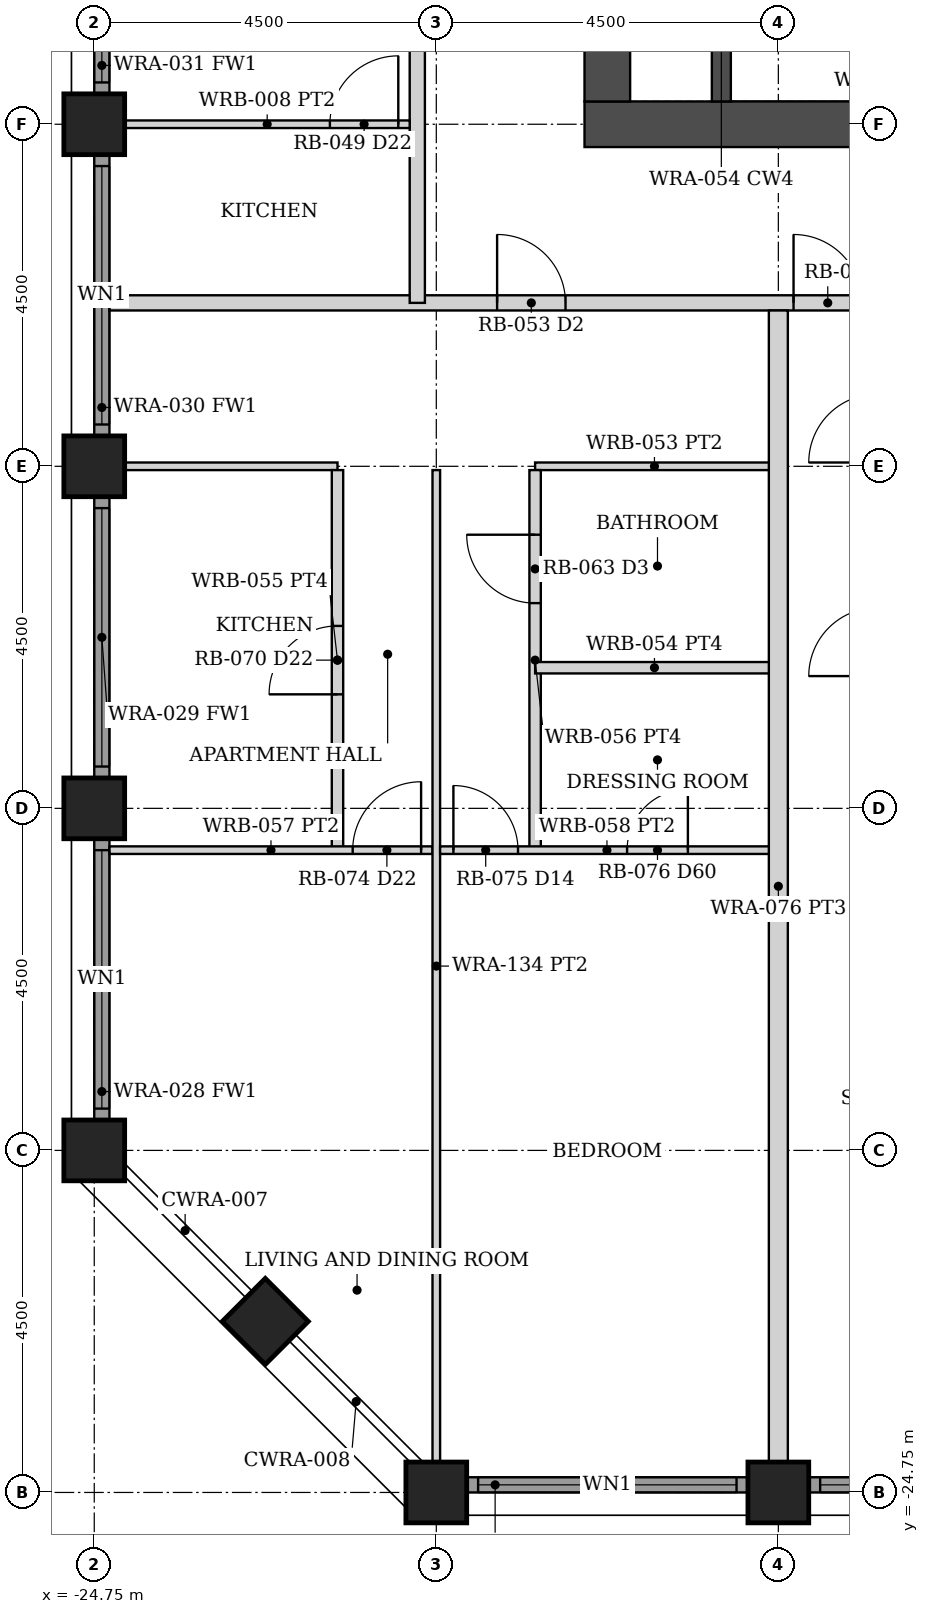
"""IFC4 building model, lengths in metres.
Left out: names, types, materials, properties, quantities, classifications, styles, units other than length and angle.
Written with IfcOpenShell. Run it as: python <this file> out.ifc"""

import sys

from ifc_helpers import new_model, si_unit, direction, frame, frame_2d, origin, origin_2d, place, context, subcontext, project, spatial, rectangle, hollow_rectangle, extrude, element, fill, save


model = new_model("IFC4")
c1 = context("Model", 3, precision=1e-05, world=origin(), true_north=direction((0.0, 1.0)))
c2 = subcontext(c1, "Body", "Model", "MODEL_VIEW")
j1 = project(units=[si_unit("LENGTHUNIT", "METRE"), si_unit("PLANEANGLEUNIT", "RADIAN")], contexts=[c1])
p1 = place(None, origin())
s1 = spatial("IfcSite", under=j1, at=p1, CompositionType="ELEMENT")
p2 = place(p1, origin())
s2 = spatial("IfcBuilding", under=s1, at=p2, CompositionType="ELEMENT")
p3 = place(p2, frame((0.0, 0.0, 37.0)))
s3 = spatial("IfcBuildingStorey", under=s2, at=p3, CompositionType="ELEMENT", Elevation=37.0)
for number, where, z_axis, x_axis in (
    (1, (-20.25, -24.75, 0.0), (0.0, 0.0, 1.0), (0.0, 1.0, 0.0)),
    (2, (-24.75, -20.25, 0.0), (0.0, 0.0, 1.0), (1.0, 0.0, 0.0)),
    (3, (-15.75, -24.75, 0.0), (0.0, 0.0, 1.0), (0.0, 1.0, 0.0)),
    (4, (-24.75, -15.75, 0.0), (0.0, 0.0, 1.0), (1.0, 0.0, 0.0)),
    (5, (-24.75, -11.25, 0.0), (0.0, 0.0, 1.0), (1.0, 0.0, 0.0)),
    (6, (-24.75, -6.75, 0.0), (0.0, 0.0, 1.0), (1.0, 0.0, 0.0)),
    (7, (-22.5, -22.5, 0.0), (0.0, 0.0, 1.0), (0.707, 0.707, 0.0)),
):
    element("IfcColumn", number, at=place(p3, frame(where, z_axis=z_axis, x_axis=x_axis)), inside=s3, PredefinedType="COLUMN", context=c2, shape_type="SweptSolid", body=[
        extrude(hollow_rectangle(XDim=0.8, YDim=0.8, WallThickness=0.07, at=origin_2d()), origin(), (0.0, 0.0, 1.0), 3.5),
    ])
p4 = place(p3, frame((-8.7, -6.75, 0.0), z_axis=(0.0, 0.0, 1.0), x_axis=(-1.0, 0.0, 0.0)))
e8 = element("IfcWall", 8, at=p4, inside=s3, PredefinedType="SHEAR", context=c2, shape_type="SweptSolid", body=[
    extrude(rectangle(XDim=9.6, YDim=0.6, at=frame_2d((4.8, 0.0))), origin(), (0.0, 0.0, 1.0), 3.5),
])
p5 = place(p3, frame((-18.0, -6.45, 0.0), z_axis=(0.0, 0.0, 1.0), x_axis=(0.0, 1.0, 0.0)))
e9 = element("IfcWall", 9, at=p5, inside=s3, PredefinedType="SHEAR", context=c2, shape_type="SweptSolid", body=[
    extrude(rectangle(XDim=12.9, YDim=0.6, at=frame_2d((6.45, 0.0))), origin(), (0.0, 0.0, 1.0), 3.5),
])
p6 = place(p3, frame((-16.5, -6.45, 0.0), z_axis=(0.0, 0.0, 1.0), x_axis=(0.0, 1.0, 0.0)))
e10 = element("IfcWall", 10, at=p6, inside=s3, PredefinedType="SHEAR", context=c2, shape_type="SweptSolid", body=[
    extrude(rectangle(XDim=3.125, YDim=0.25, at=frame_2d((1.562, 0.0))), origin(), (0.0, 0.0, 1.0), 3.5),
])
p7 = place(p3, frame((-19.845, -24.65, 0.0), z_axis=(0.0, 0.0, 1.0), x_axis=(1.0, 0.0, 0.0)))
e11 = element("IfcWall", 11, at=p7, inside=s3, PredefinedType="SOLIDWALL", context=c2, shape_type="SweptSolid", body=[
    extrude(rectangle(XDim=3.69, YDim=0.2, at=frame_2d((1.845, 0.0))), origin(), (0.0, 0.0, 1.0), 2.379),
])
p8 = place(p7, frame((0.145, 0.0, 0.3)))
e12 = element("IfcOpeningElement", 12, at=p8, cuts=e11, PredefinedType="OPENING", context=c2, shape_type="SweptSolid", body=[
    extrude(rectangle(XDim=3.4, YDim=1.929, at=frame_2d((1.7, 0.964))), frame((0.0, 0.11, 0.0), z_axis=(0.0, -1.0, 0.0), x_axis=(1.0, 0.0, 0.0)), (0.0, 0.0, 1.0), 0.22),
])
p9 = place(p3, frame((-15.345, -24.65, 0.0), z_axis=(0.0, 0.0, 1.0), x_axis=(1.0, 0.0, 0.0)))
e13 = element("IfcWall", 13, at=p9, inside=s3, PredefinedType="SOLIDWALL", context=c2, shape_type="SweptSolid", body=[
    extrude(rectangle(XDim=3.69, YDim=0.2, at=frame_2d((1.845, 0.0))), origin(), (0.0, 0.0, 1.0), 2.379),
])
p10 = place(p9, frame((0.145, 0.0, 0.3)))
e14 = element("IfcOpeningElement", 14, at=p10, cuts=e13, PredefinedType="OPENING", context=c2, shape_type="SweptSolid", body=[
    extrude(rectangle(XDim=3.4, YDim=1.929, at=frame_2d((1.7, 0.964))), frame((0.0, 0.11, 0.0), z_axis=(0.0, -1.0, 0.0), x_axis=(1.0, 0.0, 0.0)), (0.0, 0.0, 1.0), 0.22),
])
p11 = place(p3, frame((-24.65, -19.845, 0.0), z_axis=(0.0, 0.0, 1.0), x_axis=(0.0, 1.0, 0.0)))
e15 = element("IfcWall", 15, at=p11, inside=s3, PredefinedType="SOLIDWALL", context=c2, shape_type="SweptSolid", body=[
    extrude(rectangle(XDim=3.69, YDim=0.2, at=frame_2d((1.845, 0.0))), origin(), (0.0, 0.0, 1.0), 2.379),
])
p12 = place(p11, frame((0.145, 0.0, 0.3)))
e16 = element("IfcOpeningElement", 16, at=p12, cuts=e15, PredefinedType="OPENING", context=c2, shape_type="SweptSolid", body=[
    extrude(rectangle(XDim=3.4, YDim=1.929, at=frame_2d((1.7, 0.964))), frame((0.0, 0.11, 0.0), z_axis=(0.0, -1.0, 0.0), x_axis=(1.0, 0.0, 0.0)), (0.0, 0.0, 1.0), 0.22),
])
p13 = place(p3, frame((-24.65, -15.345, 0.0), z_axis=(0.0, 0.0, 1.0), x_axis=(0.0, 1.0, 0.0)))
e17 = element("IfcWall", 17, at=p13, inside=s3, PredefinedType="SOLIDWALL", context=c2, shape_type="SweptSolid", body=[
    extrude(rectangle(XDim=3.69, YDim=0.2, at=frame_2d((1.845, 0.0))), origin(), (0.0, 0.0, 1.0), 2.379),
])
p14 = place(p13, frame((0.145, 0.0, 0.3)))
e18 = element("IfcOpeningElement", 18, at=p14, cuts=e17, PredefinedType="OPENING", context=c2, shape_type="SweptSolid", body=[
    extrude(rectangle(XDim=3.4, YDim=1.929, at=frame_2d((1.7, 0.964))), frame((0.0, 0.11, 0.0), z_axis=(0.0, -1.0, 0.0), x_axis=(1.0, 0.0, 0.0)), (0.0, 0.0, 1.0), 0.22),
])
p15 = place(p3, frame((-24.65, -10.845, 0.0), z_axis=(0.0, 0.0, 1.0), x_axis=(0.0, 1.0, 0.0)))
e19 = element("IfcWall", 19, at=p15, inside=s3, PredefinedType="SOLIDWALL", context=c2, shape_type="SweptSolid", body=[
    extrude(rectangle(XDim=3.69, YDim=0.2, at=frame_2d((1.845, 0.0))), origin(), (0.0, 0.0, 1.0), 2.379),
])
p16 = place(p15, frame((0.145, 0.0, 0.3)))
e20 = element("IfcOpeningElement", 20, at=p16, cuts=e19, PredefinedType="OPENING", context=c2, shape_type="SweptSolid", body=[
    extrude(rectangle(XDim=3.4, YDim=1.929, at=frame_2d((1.7, 0.964))), frame((0.0, 0.11, 0.0), z_axis=(0.0, -1.0, 0.0), x_axis=(1.0, 0.0, 0.0)), (0.0, 0.0, 1.0), 0.22),
])
p17 = place(p3, frame((-24.65, -6.345, 0.0), z_axis=(0.0, 0.0, 1.0), x_axis=(0.0, 1.0, 0.0)))
e21 = element("IfcWall", 21, at=p17, inside=s3, PredefinedType="SOLIDWALL", context=c2, shape_type="SweptSolid", body=[
    extrude(rectangle(XDim=3.69, YDim=0.2, at=frame_2d((1.845, 0.0))), origin(), (0.0, 0.0, 1.0), 2.379),
])
p18 = place(p17, frame((0.145, 0.0, 0.3)))
e22 = element("IfcOpeningElement", 22, at=p18, cuts=e21, PredefinedType="OPENING", context=c2, shape_type="SweptSolid", body=[
    extrude(rectangle(XDim=3.4, YDim=1.929, at=frame_2d((1.7, 0.964))), frame((0.0, 0.11, 0.0), z_axis=(0.0, -1.0, 0.0), x_axis=(1.0, 0.0, 0.0)), (0.0, 0.0, 1.0), 0.22),
])
p19 = place(p3, frame((-24.55, -9.1, 0.0), z_axis=(0.0, 0.0, 1.0), x_axis=(1.0, 0.0, 0.0)))
e23 = element("IfcWall", 23, at=p19, inside=s3, PredefinedType="PARTITIONING", context=c2, shape_type="SweptSolid", body=[
    extrude(rectangle(XDim=49.1, YDim=0.2, at=frame_2d((24.55, 0.0))), origin(), (0.0, 0.0, 1.0), 2.373),
])
p20 = place(p19, frame((5.1, 0.0, 0.0)))
e24 = element("IfcOpeningElement", 24, at=p20, cuts=e23, PredefinedType="OPENING", context=c2, shape_type="SweptSolid", body=[
    extrude(rectangle(XDim=0.9, YDim=2.1, at=frame_2d((0.45, 1.05))), frame((0.0, 0.11, 0.0), z_axis=(0.0, -1.0, 0.0), x_axis=(1.0, 0.0, 0.0)), (0.0, 0.0, 1.0), 0.22),
])
p21 = place(p19, frame((9.0, 0.0, 0.0)))
e25 = element("IfcOpeningElement", 25, at=p21, cuts=e23, PredefinedType="OPENING", context=c2, shape_type="SweptSolid", body=[
    extrude(rectangle(XDim=0.9, YDim=2.1, at=frame_2d((0.45, 1.05))), frame((0.0, 0.11, 0.0), z_axis=(0.0, -1.0, 0.0), x_axis=(1.0, 0.0, 0.0)), (0.0, 0.0, 1.0), 0.22),
])
p22 = place(p19, frame((18.1, 0.0, 0.0)))
e26 = element("IfcOpeningElement", 26, at=p22, cuts=e23, PredefinedType="OPENING", context=c2, shape_type="SweptSolid", body=[
    extrude(rectangle(XDim=0.9, YDim=2.1, at=frame_2d((0.45, 1.05))), frame((0.0, 0.11, 0.0), z_axis=(0.0, -1.0, 0.0), x_axis=(1.0, 0.0, 0.0)), (0.0, 0.0, 1.0), 0.22),
])
p23 = place(p19, frame((22.5, 0.0, 0.0)))
e27 = element("IfcOpeningElement", 27, at=p23, cuts=e23, PredefinedType="OPENING", context=c2, shape_type="SweptSolid", body=[
    extrude(rectangle(XDim=0.9, YDim=2.1, at=frame_2d((0.45, 1.05))), frame((0.0, 0.11, 0.0), z_axis=(0.0, -1.0, 0.0), x_axis=(1.0, 0.0, 0.0)), (0.0, 0.0, 1.0), 0.22),
])
p24 = place(p19, frame((27.1, 0.0, 0.0)))
e28 = element("IfcOpeningElement", 28, at=p24, cuts=e23, PredefinedType="OPENING", context=c2, shape_type="SweptSolid", body=[
    extrude(rectangle(XDim=0.9, YDim=2.1, at=frame_2d((0.45, 1.05))), frame((0.0, 0.11, 0.0), z_axis=(0.0, -1.0, 0.0), x_axis=(1.0, 0.0, 0.0)), (0.0, 0.0, 1.0), 0.22),
])
p25 = place(p19, frame((36.0, 0.0, 0.0)))
e29 = element("IfcOpeningElement", 29, at=p25, cuts=e23, PredefinedType="OPENING", context=c2, shape_type="SweptSolid", body=[
    extrude(rectangle(XDim=0.9, YDim=2.1, at=frame_2d((0.45, 1.05))), frame((0.0, 0.11, 0.0), z_axis=(0.0, -1.0, 0.0), x_axis=(1.0, 0.0, 0.0)), (0.0, 0.0, 1.0), 0.22),
])
p26 = place(p19, frame((43.1, 0.0, 0.0)))
e30 = element("IfcOpeningElement", 30, at=p26, cuts=e23, PredefinedType="OPENING", context=c2, shape_type="SweptSolid", body=[
    extrude(rectangle(XDim=0.9, YDim=2.1, at=frame_2d((0.45, 1.05))), frame((0.0, 0.11, 0.0), z_axis=(0.0, -1.0, 0.0), x_axis=(1.0, 0.0, 0.0)), (0.0, 0.0, 1.0), 0.22),
])
p27 = place(p3, frame((-20.5, -9.1, 0.0), z_axis=(0.0, 0.0, 1.0), x_axis=(0.0, 1.0, 0.0)))
e31 = element("IfcWall", 31, at=p27, inside=s3, PredefinedType="PARTITIONING", context=c2, shape_type="SweptSolid", body=[
    extrude(rectangle(XDim=18.2, YDim=0.2, at=frame_2d((9.1, 0.0))), origin(), (0.0, 0.0, 1.0), 2.373),
])
p28 = place(p27, frame((6.4, 0.0, 0.0)))
e32 = element("IfcOpeningElement", 32, at=p28, cuts=e31, PredefinedType="OPENING", context=c2, shape_type="SweptSolid", body=[
    extrude(rectangle(XDim=0.9, YDim=2.1, at=frame_2d((0.45, 1.05))), frame((0.0, 0.11, 0.0), z_axis=(0.0, -1.0, 0.0), x_axis=(1.0, 0.0, 0.0)), (0.0, 0.0, 1.0), 0.22),
])
p29 = place(p3, frame((-24.35, -11.25, 0.0), z_axis=(0.0, 0.0, 1.0), x_axis=(1.0, 0.0, 0.0)))
e33 = element("IfcWall", 33, at=p29, inside=s3, PredefinedType="PARTITIONING", context=c2, shape_type="SweptSolid", body=[
    extrude(rectangle(XDim=2.8, YDim=0.1, at=frame_2d((1.4, 0.0))), origin(), (0.0, 0.0, 1.0), 2.373),
])
p30 = place(p3, frame((-21.55, -16.3, 0.0), z_axis=(0.0, 0.0, 1.0), x_axis=(0.0, 1.0, 0.0)))
e34 = element("IfcWall", 34, at=p30, inside=s3, PredefinedType="PARTITIONING", context=c2, shape_type="SweptSolid", body=[
    extrude(rectangle(XDim=5.0, YDim=0.15, at=frame_2d((2.5, 0.0))), origin(), (0.0, 0.0, 1.0), 2.373),
])
p31 = place(p30, frame((2.05, 0.0, 0.0)))
e35 = element("IfcOpeningElement", 35, at=p31, cuts=e34, PredefinedType="OPENING", context=c2, shape_type="SweptSolid", body=[
    extrude(rectangle(XDim=0.9, YDim=2.1, at=frame_2d((0.45, 1.05))), frame((0.0, 0.085, 0.0), z_axis=(0.0, -1.0, 0.0), x_axis=(1.0, 0.0, 0.0)), (0.0, 0.0, 1.0), 0.17),
])
p32 = place(p3, frame((-24.55, -16.3, 0.0), z_axis=(0.0, 0.0, 1.0), x_axis=(1.0, 0.0, 0.0)))
e36 = element("IfcWall", 36, at=p32, inside=s3, PredefinedType="PARTITIONING", context=c2, shape_type="SweptSolid", body=[
    extrude(rectangle(XDim=4.25, YDim=0.1, at=frame_2d((2.125, 0.0))), origin(), (0.0, 0.0, 1.0), 2.373),
])
p33 = place(p32, frame((3.2, 0.0, 0.0)))
e37 = element("IfcOpeningElement", 37, at=p33, cuts=e36, PredefinedType="OPENING", context=c2, shape_type="SweptSolid", body=[
    extrude(rectangle(XDim=0.9, YDim=2.1, at=frame_2d((0.45, 1.05))), frame((0.0, 0.06, 0.0), z_axis=(0.0, -1.0, 0.0), x_axis=(1.0, 0.0, 0.0)), (0.0, 0.0, 1.0), 0.12),
])
p34 = place(p3, frame((-20.25, -24.35, 0.0), z_axis=(0.0, 0.0, 1.0), x_axis=(0.0, 1.0, 0.0)))
e38 = element("IfcWall", 38, at=p34, inside=s3, PredefinedType="PARTITIONING", context=c2, shape_type="SweptSolid", body=[
    extrude(rectangle(XDim=13.05, YDim=0.1, at=frame_2d((6.525, 0.0))), origin(), (0.0, 0.0, 1.0), 2.373),
])
p35 = place(p3, frame((-18.95, -11.25, 0.0), z_axis=(0.0, 0.0, 1.0), x_axis=(1.0, 0.0, 0.0)))
e39 = element("IfcWall", 39, at=p35, inside=s3, PredefinedType="PARTITIONING", context=c2, shape_type="SweptSolid", body=[
    extrude(rectangle(XDim=3.14, YDim=0.1, at=frame_2d((1.57, 0.0))), origin(), (0.0, 0.0, 1.0), 2.373),
])
p36 = place(p3, frame((-18.95, -16.3, 0.0), z_axis=(0.0, 0.0, 1.0), x_axis=(0.0, 1.0, 0.0)))
e40 = element("IfcWall", 40, at=p36, inside=s3, PredefinedType="PARTITIONING", context=c2, shape_type="SweptSolid", body=[
    extrude(rectangle(XDim=5.0, YDim=0.15, at=frame_2d((2.5, 0.0))), origin(), (0.0, 0.0, 1.0), 2.373),
])
p37 = place(p36, frame((3.25, 0.0, 0.0)))
e41 = element("IfcOpeningElement", 41, at=p37, cuts=e40, PredefinedType="OPENING", context=c2, shape_type="SweptSolid", body=[
    extrude(rectangle(XDim=0.9, YDim=2.1, at=frame_2d((0.45, 1.05))), frame((0.0, 0.085, 0.0), z_axis=(0.0, -1.0, 0.0), x_axis=(1.0, 0.0, 0.0)), (0.0, 0.0, 1.0), 0.17),
])
p38 = place(p3, frame((-20.2, -16.3, 0.0), z_axis=(0.0, 0.0, 1.0), x_axis=(1.0, 0.0, 0.0)))
e42 = element("IfcWall", 42, at=p38, inside=s3, PredefinedType="PARTITIONING", context=c2, shape_type="SweptSolid", body=[
    extrude(rectangle(XDim=4.39, YDim=0.1, at=frame_2d((2.195, 0.0))), origin(), (0.0, 0.0, 1.0), 2.373),
])
p39 = place(p38, frame((0.175, 0.0, 0.0)))
e43 = element("IfcOpeningElement", 43, at=p39, cuts=e42, PredefinedType="OPENING", context=c2, shape_type="SweptSolid", body=[
    extrude(rectangle(XDim=0.85, YDim=2.1, at=frame_2d((0.425, 1.05))), frame((0.0, 0.06, 0.0), z_axis=(0.0, -1.0, 0.0), x_axis=(1.0, 0.0, 0.0)), (0.0, 0.0, 1.0), 0.12),
])
p40 = place(p38, frame((2.46, 0.0, 0.0)))
e44 = element("IfcOpeningElement", 44, at=p40, cuts=e42, PredefinedType="OPENING", context=c2, shape_type="SweptSolid", body=[
    extrude(rectangle(XDim=0.8, YDim=2.1, at=frame_2d((0.4, 1.05))), frame((0.0, 0.06, 0.0), z_axis=(0.0, -1.0, 0.0), x_axis=(1.0, 0.0, 0.0)), (0.0, 0.0, 1.0), 0.12),
])
p41 = place(p3, frame((-18.95, -13.9, 0.0), z_axis=(0.0, 0.0, 1.0), x_axis=(1.0, 0.0, 0.0)))
e45 = element("IfcWall", 45, at=p41, inside=s3, PredefinedType="PARTITIONING", context=c2, shape_type="SweptSolid", body=[
    extrude(rectangle(XDim=3.14, YDim=0.15, at=frame_2d((1.57, 0.0))), origin(), (0.0, 0.0, 1.0), 2.373),
])
p42 = place(p3, frame((-15.75, -24.35, 0.0), z_axis=(0.0, 0.0, 1.0), x_axis=(0.0, 1.0, 0.0)))
e46 = element("IfcWall", 46, at=p42, inside=s3, PredefinedType="PARTITIONING", context=c2, shape_type="SweptSolid", body=[
    extrude(rectangle(XDim=15.15, YDim=0.25, at=frame_2d((7.575, 0.0))), origin(), (0.0, 0.0, 1.0), 2.373),
])
p43 = place(p3, frame((-24.35, -6.75, 0.0), z_axis=(0.0, 0.0, 1.0), x_axis=(1.0, 0.0, 0.0)))
e47 = element("IfcWall", 47, at=p43, inside=s3, PredefinedType="PARTITIONING", context=c2, shape_type="SweptSolid", body=[
    extrude(rectangle(XDim=3.75, YDim=0.1, at=frame_2d((1.875, 0.0))), origin(), (0.0, 0.0, 1.0), 2.373),
])
p44 = place(p43, frame((2.7, 0.0, 0.0)))
e48 = element("IfcOpeningElement", 48, at=p44, cuts=e47, PredefinedType="OPENING", context=c2, shape_type="SweptSolid", body=[
    extrude(rectangle(XDim=0.9, YDim=2.1, at=frame_2d((0.45, 1.05))), frame((0.0, 0.06, 0.0), z_axis=(0.0, -1.0, 0.0), x_axis=(1.0, 0.0, 0.0)), (0.0, 0.0, 1.0), 0.12),
])
p45 = place(p8, origin())
e49 = element("IfcWindow", 49, at=p45, inside=s3, PartitioningType="SINGLE_PANEL", PredefinedType="WINDOW", context=c2, shape_type="SweptSolid", body=[
    extrude(rectangle(XDim=3.4, YDim=1.929, at=frame_2d((1.7, 0.964))), frame((0.0, 0.03, 0.0), z_axis=(0.0, -1.0, 0.0), x_axis=(1.0, 0.0, 0.0)), (0.0, 0.0, 1.0), 0.06),
])
fill(e12, e49)
p46 = place(p10, origin())
e50 = element("IfcWindow", 50, at=p46, inside=s3, PartitioningType="SINGLE_PANEL", PredefinedType="WINDOW", context=c2, shape_type="SweptSolid", body=[
    extrude(rectangle(XDim=3.4, YDim=1.929, at=frame_2d((1.7, 0.964))), frame((0.0, 0.03, 0.0), z_axis=(0.0, -1.0, 0.0), x_axis=(1.0, 0.0, 0.0)), (0.0, 0.0, 1.0), 0.06),
])
fill(e14, e50)
p47 = place(p12, origin())
e51 = element("IfcWindow", 51, at=p47, inside=s3, PartitioningType="SINGLE_PANEL", PredefinedType="WINDOW", context=c2, shape_type="SweptSolid", body=[
    extrude(rectangle(XDim=3.4, YDim=1.929, at=frame_2d((1.7, 0.964))), frame((0.0, 0.03, 0.0), z_axis=(0.0, -1.0, 0.0), x_axis=(1.0, 0.0, 0.0)), (0.0, 0.0, 1.0), 0.06),
])
fill(e16, e51)
p48 = place(p14, origin())
e52 = element("IfcWindow", 52, at=p48, inside=s3, PartitioningType="SINGLE_PANEL", PredefinedType="WINDOW", context=c2, shape_type="SweptSolid", body=[
    extrude(rectangle(XDim=3.4, YDim=1.929, at=frame_2d((1.7, 0.964))), frame((0.0, 0.03, 0.0), z_axis=(0.0, -1.0, 0.0), x_axis=(1.0, 0.0, 0.0)), (0.0, 0.0, 1.0), 0.06),
])
fill(e18, e52)
p49 = place(p16, origin())
e53 = element("IfcWindow", 53, at=p49, inside=s3, PartitioningType="SINGLE_PANEL", PredefinedType="WINDOW", context=c2, shape_type="SweptSolid", body=[
    extrude(rectangle(XDim=3.4, YDim=1.929, at=frame_2d((1.7, 0.964))), frame((0.0, 0.03, 0.0), z_axis=(0.0, -1.0, 0.0), x_axis=(1.0, 0.0, 0.0)), (0.0, 0.0, 1.0), 0.06),
])
fill(e20, e53)
p50 = place(p18, origin())
e54 = element("IfcWindow", 54, at=p50, inside=s3, PartitioningType="SINGLE_PANEL", PredefinedType="WINDOW", context=c2, shape_type="SweptSolid", body=[
    extrude(rectangle(XDim=3.4, YDim=1.929, at=frame_2d((1.7, 0.964))), frame((0.0, 0.03, 0.0), z_axis=(0.0, -1.0, 0.0), x_axis=(1.0, 0.0, 0.0)), (0.0, 0.0, 1.0), 0.06),
])
fill(e22, e54)
p51 = place(p20, origin())
e55 = element("IfcDoor", 55, at=p51, inside=s3, OperationType="SINGLE_SWING_LEFT", PredefinedType="DOOR", context=c2, shape_type="SweptSolid", body=[
    extrude(rectangle(XDim=0.9, YDim=2.1, at=frame_2d((0.45, 1.05))), frame((0.0, 0.025, 0.0), z_axis=(0.0, -1.0, 0.0), x_axis=(1.0, 0.0, 0.0)), (0.0, 0.0, 1.0), 0.05),
])
fill(e24, e55)
p52 = place(p31, origin())
e56 = element("IfcDoor", 56, at=p52, inside=s3, OperationType="SINGLE_SWING_LEFT", PredefinedType="DOOR", context=c2, shape_type="SweptSolid", body=[
    extrude(rectangle(XDim=0.9, YDim=2.1, at=frame_2d((0.45, 1.05))), frame((0.0, 0.025, 0.0), z_axis=(0.0, -1.0, 0.0), x_axis=(1.0, 0.0, 0.0)), (0.0, 0.0, 1.0), 0.05),
])
fill(e35, e56)
p53 = place(p33, origin())
e57 = element("IfcDoor", 57, at=p53, inside=s3, OperationType="SINGLE_SWING_RIGHT", PredefinedType="DOOR", context=c2, shape_type="SweptSolid", body=[
    extrude(rectangle(XDim=0.9, YDim=2.1, at=frame_2d((0.45, 1.05))), frame((0.0, 0.025, 0.0), z_axis=(0.0, -1.0, 0.0), x_axis=(1.0, 0.0, 0.0)), (0.0, 0.0, 1.0), 0.05),
])
fill(e37, e57)
p54 = place(p39, origin())
e58 = element("IfcDoor", 58, at=p54, inside=s3, OperationType="SINGLE_SWING_LEFT", PredefinedType="DOOR", context=c2, shape_type="SweptSolid", body=[
    extrude(rectangle(XDim=0.85, YDim=2.1, at=frame_2d((0.425, 1.05))), frame((0.0, 0.025, 0.0), z_axis=(0.0, -1.0, 0.0), x_axis=(1.0, 0.0, 0.0)), (0.0, 0.0, 1.0), 0.05),
])
fill(e43, e58)
p55 = place(p37, origin())
e59 = element("IfcDoor", 59, at=p55, inside=s3, OperationType="SINGLE_SWING_RIGHT", PredefinedType="DOOR", context=c2, shape_type="SweptSolid", body=[
    extrude(rectangle(XDim=0.9, YDim=2.1, at=frame_2d((0.45, 1.05))), frame((0.0, 0.025, 0.0), z_axis=(0.0, -1.0, 0.0), x_axis=(1.0, 0.0, 0.0)), (0.0, 0.0, 1.0), 0.05),
])
fill(e41, e59)
p56 = place(p40, origin())
e60 = element("IfcDoor", 60, at=p56, inside=s3, OperationType="SINGLE_SWING_RIGHT", PredefinedType="DOOR", context=c2, shape_type="SweptSolid", body=[
    extrude(rectangle(XDim=0.8, YDim=2.1, at=frame_2d((0.4, 1.05))), frame((0.0, 0.025, 0.0), z_axis=(0.0, -1.0, 0.0), x_axis=(1.0, 0.0, 0.0)), (0.0, 0.0, 1.0), 0.05),
])
fill(e44, e60)
p57 = place(p21, origin())
e61 = element("IfcDoor", 61, at=p57, inside=s3, OperationType="SINGLE_SWING_LEFT", PredefinedType="DOOR", context=c2, shape_type="SweptSolid", body=[
    extrude(rectangle(XDim=0.9, YDim=2.1, at=frame_2d((0.45, 1.05))), frame((0.0, 0.025, 0.0), z_axis=(0.0, -1.0, 0.0), x_axis=(1.0, 0.0, 0.0)), (0.0, 0.0, 1.0), 0.05),
])
fill(e25, e61)
p58 = place(p44, origin())
e62 = element("IfcDoor", 62, at=p58, inside=s3, OperationType="SINGLE_SWING_RIGHT", PredefinedType="DOOR", context=c2, shape_type="SweptSolid", body=[
    extrude(rectangle(XDim=0.9, YDim=2.1, at=frame_2d((0.45, 1.05))), frame((0.0, 0.025, 0.0), z_axis=(0.0, -1.0, 0.0), x_axis=(1.0, 0.0, 0.0)), (0.0, 0.0, 1.0), 0.05),
])
fill(e48, e62)
save(model, sys.argv[1])
